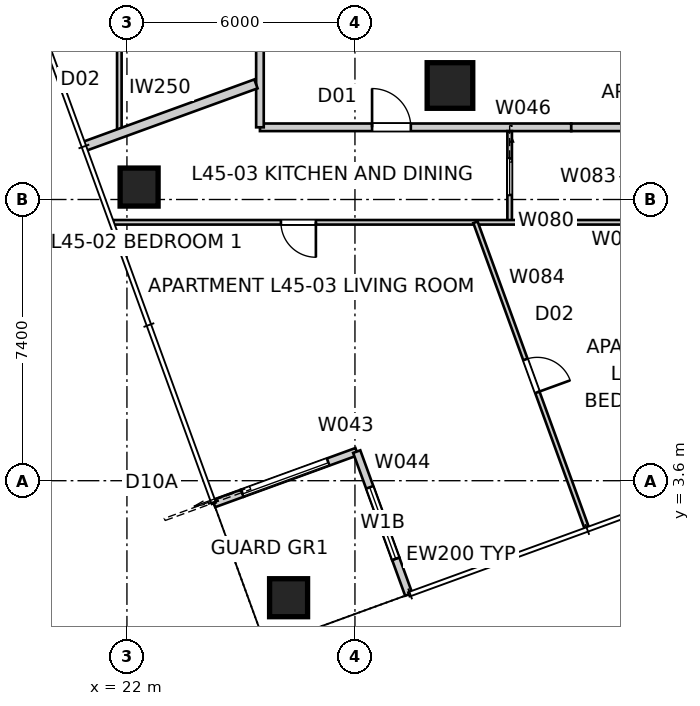
"""IFC4 building model, lengths in metres.
Left out: names, types, materials, properties, quantities, classifications, styles, units other than length and angle.
Written with IfcOpenShell. Run it as: python <this file> out.ifc"""

import sys

from ifc_helpers import new_model, si_unit, direction, frame, frame_2d, origin, origin_2d, place, context, subcontext, project, spatial, rectangle, extrude, element, fill, save


model = new_model("IFC4")
c1 = context("Model", 3, precision=1e-05, world=origin(), true_north=direction((0.0, 1.0)))
c2 = subcontext(c1, "Body", "Model", "MODEL_VIEW")
j1 = project(units=[si_unit("LENGTHUNIT", "METRE"), si_unit("PLANEANGLEUNIT", "RADIAN")], contexts=[c1])
p1 = place(None, origin())
s1 = spatial("IfcSite", under=j1, at=p1, CompositionType="ELEMENT")
p2 = place(p1, origin())
s2 = spatial("IfcBuilding", under=s1, at=p2, CompositionType="ELEMENT")
p3 = place(p2, frame((0.0, 0.0, 164.2)))
s3 = spatial("IfcBuildingStorey", under=s2, at=p3, CompositionType="ELEMENT", Elevation=164.2)
for number, where, z_axis, x_axis in (
    (1, (26.253, 0.521, 0.0), (0.0, 0.0, 1.0), (1.0, 0.0, 0.0)),
    (2, (22.32, 11.327, 0.0), (0.0, 0.0, 1.0), (1.0, 0.0, 0.0)),
):
    element("IfcColumn", number, at=place(p3, frame(where, z_axis=z_axis, x_axis=x_axis)), inside=s3, PredefinedType="COLUMN", context=c2, shape_type="SweptSolid", body=[
        extrude(rectangle(XDim=1.0, YDim=1.0, at=origin_2d()), origin(), (0.0, 0.0, 1.0), 3.4),
    ])
p4 = place(p3, frame((30.5, 14.0, 0.0), z_axis=(0.0, 0.0, 1.0), x_axis=(1.0, 0.0, 0.0)))
e3 = element("IfcColumn", 3, at=p4, inside=s3, PredefinedType="COLUMN", context=c2, shape_type="SweptSolid", body=[
    extrude(rectangle(XDim=1.2, YDim=1.2, at=origin_2d()), origin(), (0.0, 0.0, 1.0), 3.4),
])
p5 = place(p3, frame((24.288, 2.998, 0.0), z_axis=(0.0, 0.0, 1.0), x_axis=(0.939659694648, 0.342110593602, 0.0)))
e4 = element("IfcWall", 4, at=p5, inside=s3, PredefinedType="SOLIDWALL", context=c2, shape_type="SweptSolid", body=[
    extrude(rectangle(XDim=0.8, YDim=0.2, at=frame_2d((0.4, 0.0))), origin(), (0.0, 0.0, 1.0), 3.25),
])
p6 = place(p3, frame((25.04, 3.271, 0.0), z_axis=(0.0, 0.0, 1.0), x_axis=(0.939693144909, 0.342018703306, 0.0)))
e5 = element("IfcWall", 5, at=p6, inside=s3, PredefinedType="SOLIDWALL", context=c2, shape_type="SweptSolid", body=[
    extrude(rectangle(XDim=3.2, YDim=0.2, at=frame_2d((1.6, 0.0))), origin(), (0.0, 0.0, 1.0), 2.722),
])
p7 = place(p6, origin())
e6 = element("IfcOpeningElement", 6, at=p7, cuts=e5, PredefinedType="OPENING", context=c2, shape_type="SweptSolid", body=[
    extrude(rectangle(XDim=2.4, YDim=2.1, at=frame_2d((1.2, 1.05))), frame((0.0, 0.11, 0.0), z_axis=(0.0, -1.0, 0.0), x_axis=(1.0, 0.0, 0.0)), (0.0, 0.0, 1.0), 0.22),
])
p8 = place(p3, frame((28.047, 4.366, 0.0), z_axis=(0.0, 0.0, 1.0), x_axis=(0.341965219194, -0.939712609717, 0.0)))
e7 = element("IfcWall", 7, at=p8, inside=s3, PredefinedType="SOLIDWALL", context=c2, shape_type="SweptSolid", body=[
    extrude(rectangle(XDim=3.0, YDim=0.2, at=frame_2d((1.5, 0.0))), origin(), (0.0, 0.0, 1.0), 2.722),
])
p9 = place(p8, frame((1.0, 0.0, 0.45)))
e8 = element("IfcOpeningElement", 8, at=p9, cuts=e7, PredefinedType="OPENING", context=c2, shape_type="SweptSolid", body=[
    extrude(rectangle(XDim=2.0, YDim=1.8, at=frame_2d((1.0, 0.9))), frame((0.0, 0.11, 0.0), z_axis=(0.0, -1.0, 0.0), x_axis=(1.0, 0.0, 0.0)), (0.0, 0.0, 1.0), 0.22),
])
p10 = place(p3, frame((29.073, 1.547, 0.0), z_axis=(0.0, 0.0, 1.0), x_axis=(0.342037080957, -0.939686455819, 0.0)))
e9 = element("IfcWall", 9, at=p10, inside=s3, PredefinedType="SOLIDWALL", context=c2, shape_type="SweptSolid", body=[
    extrude(rectangle(XDim=1.0, YDim=0.2, at=frame_2d((0.5, 0.0))), origin(), (0.0, 0.0, 1.0), 3.25),
])
p11 = place(p3, frame((25.5, 12.9, 0.0), z_axis=(0.0, 0.0, 1.0), x_axis=(1.0, 0.0, 0.0)))
e10 = element("IfcWall", 10, at=p11, inside=s3, PredefinedType="PARTITIONING", context=c2, shape_type="SweptSolid", body=[
    extrude(rectangle(XDim=8.192, YDim=0.2, at=frame_2d((4.096, 0.0))), origin(), (0.0, 0.0, 1.0), 3.25),
])
p12 = place(p11, frame((2.95, 0.0, 0.0)))
e11 = element("IfcOpeningElement", 11, at=p12, cuts=e10, PredefinedType="OPENING", context=c2, shape_type="SweptSolid", body=[
    extrude(rectangle(XDim=1.02, YDim=2.34, at=frame_2d((0.51, 1.17))), frame((0.0, 0.11, 0.0), z_axis=(0.0, -1.0, 0.0), x_axis=(1.0, 0.0, 0.0)), (0.0, 0.0, 1.0), 0.22),
])
p13 = place(p3, frame((33.692, 12.9, 0.0), z_axis=(0.0, 0.0, 1.0), x_axis=(1.0, 0.0, 0.0)))
e12 = element("IfcWall", 12, at=p13, inside=s3, PredefinedType="PARTITIONING", context=c2, shape_type="SweptSolid", body=[
    extrude(rectangle(XDim=1.683, YDim=0.2, at=frame_2d((0.842, 0.0))), origin(), (0.0, 0.0, 1.0), 2.55),
])
p14 = place(p3, frame((25.5, 46.7, 0.0), z_axis=(0.0, 0.0, 1.0), x_axis=(0.0, -1.0, 0.0)))
e13 = element("IfcWall", 13, at=p14, inside=s3, PredefinedType="PARTITIONING", context=c2, shape_type="SweptSolid", body=[
    extrude(rectangle(XDim=33.8, YDim=0.2, at=frame_2d((16.9, 0.0))), origin(), (0.0, 0.0, 1.0), 3.25),
])
p15 = place(p14, frame((28.951, 0.0, 0.0)))
e14 = element("IfcOpeningElement", 14, at=p15, cuts=e13, PredefinedType="OPENING", context=c2, shape_type="SweptSolid", body=[
    extrude(rectangle(XDim=1.02, YDim=2.34, at=frame_2d((0.51, 1.17))), frame((0.0, 0.11, 0.0), z_axis=(0.0, -1.0, 0.0), x_axis=(1.0, 0.0, 0.0)), (0.0, 0.0, 1.0), 0.22),
])
p16 = place(p14, frame((13.881, 0.0, 0.0)))
e15 = element("IfcOpeningElement", 15, at=p16, cuts=e13, PredefinedType="OPENING", context=c2, shape_type="SweptSolid", body=[
    extrude(rectangle(XDim=1.02, YDim=2.34, at=frame_2d((0.51, 1.17))), frame((0.0, 0.11, 0.0), z_axis=(0.0, -1.0, 0.0), x_axis=(1.0, 0.0, 0.0)), (0.0, 0.0, 1.0), 0.22),
])
p17 = place(p14, frame((1.97, 0.0, 0.0)))
e16 = element("IfcOpeningElement", 16, at=p17, cuts=e13, PredefinedType="OPENING", context=c2, shape_type="SweptSolid", body=[
    extrude(rectangle(XDim=1.02, YDim=2.34, at=frame_2d((0.51, 1.17))), frame((0.0, 0.11, 0.0), z_axis=(0.0, -1.0, 0.0), x_axis=(1.0, 0.0, 0.0)), (0.0, 0.0, 1.0), 0.22),
])
p18 = place(p3, frame((20.868, 12.395, 0.0), z_axis=(0.0, 0.0, 1.0), x_axis=(0.939677962656, 0.342060413521, 0.0)))
e17 = element("IfcWall", 17, at=p18, inside=s3, PredefinedType="PARTITIONING", context=c2, shape_type="SweptSolid", body=[
    extrude(rectangle(XDim=4.818, YDim=0.25, at=frame_2d((2.409, 0.0))), origin(), (0.0, 0.0, 1.0), 3.25),
])
p19 = place(p3, frame((21.8, 12.734, 0.0), z_axis=(0.0, 0.0, 1.0), x_axis=(0.0, 1.0, 0.0)))
e18 = element("IfcWall", 18, at=p19, inside=s3, PredefinedType="PARTITIONING", context=c2, shape_type="SweptSolid", body=[
    extrude(rectangle(XDim=29.357, YDim=0.12, at=frame_2d((14.678, 0.0))), origin(), (0.0, 0.0, 1.0), 3.25),
])
p20 = place(p19, frame((2.227, 0.0, 0.0)))
e19 = element("IfcOpeningElement", 19, at=p20, cuts=e18, PredefinedType="OPENING", context=c2, shape_type="SweptSolid", body=[
    extrude(rectangle(XDim=0.92, YDim=2.34, at=frame_2d((0.46, 1.17))), frame((0.0, 0.07, 0.0), z_axis=(0.0, -1.0, 0.0), x_axis=(1.0, 0.0, 0.0)), (0.0, 0.0, 1.0), 0.14),
])
p21 = place(p19, frame((5.996, 0.0, 0.0)))
e20 = element("IfcOpeningElement", 20, at=p21, cuts=e18, PredefinedType="OPENING", context=c2, shape_type="SweptSolid", body=[
    extrude(rectangle(XDim=0.92, YDim=2.34, at=frame_2d((0.46, 1.17))), frame((0.0, 0.07, 0.0), z_axis=(0.0, -1.0, 0.0), x_axis=(1.0, 0.0, 0.0)), (0.0, 0.0, 1.0), 0.14),
])
p22 = place(p19, frame((18.415, 0.0, 0.0)))
e21 = element("IfcOpeningElement", 21, at=p22, cuts=e18, PredefinedType="OPENING", context=c2, shape_type="SweptSolid", body=[
    extrude(rectangle(XDim=0.92, YDim=2.34, at=frame_2d((0.46, 1.17))), frame((0.0, 0.07, 0.0), z_axis=(0.0, -1.0, 0.0), x_axis=(1.0, 0.0, 0.0)), (0.0, 0.0, 1.0), 0.14),
])
p23 = place(p19, frame((26.769, 0.0, 0.0)))
e22 = element("IfcOpeningElement", 22, at=p23, cuts=e18, PredefinedType="OPENING", context=c2, shape_type="SweptSolid", body=[
    extrude(rectangle(XDim=0.96, YDim=2.1, at=frame_2d((0.48, 1.05))), frame((0.0, 0.07, 0.0), z_axis=(0.0, -1.0, 0.0), x_axis=(1.0, 0.0, 0.0)), (0.0, 0.0, 1.0), 0.14),
])
p24 = place(p3, frame((32.071, 12.8, 0.0), z_axis=(0.0, 0.0, 1.0), x_axis=(0.0, -1.0, 0.0)))
e23 = element("IfcWall", 23, at=p24, inside=s3, PredefinedType="PARTITIONING", context=c2, shape_type="SweptSolid", body=[
    extrude(rectangle(XDim=2.4, YDim=0.12, at=frame_2d((1.2, 0.0))), origin(), (0.0, 0.0, 1.0), 3.25),
])
p25 = place(p24, frame((0.72, 0.0, 0.0)))
e24 = element("IfcOpeningElement", 24, at=p25, cuts=e23, PredefinedType="OPENING", context=c2, shape_type="SweptSolid", body=[
    extrude(rectangle(XDim=0.96, YDim=2.1, at=frame_2d((0.48, 1.05))), frame((0.0, 0.07, 0.0), z_axis=(0.0, -1.0, 0.0), x_axis=(1.0, 0.0, 0.0)), (0.0, 0.0, 1.0), 0.14),
])
p26 = place(p3, frame((56.281, 10.4, 0.0), z_axis=(0.0, 0.0, 1.0), x_axis=(-1.0, 0.0, 0.0)))
e25 = element("IfcWall", 25, at=p26, inside=s3, PredefinedType="PARTITIONING", context=c2, shape_type="SweptSolid", body=[
    extrude(rectangle(XDim=34.647, YDim=0.12, at=frame_2d((17.324, 0.0))), origin(), (0.0, 0.0, 1.0), 3.25),
])
p27 = place(p26, frame((29.309, 0.0, 0.0)))
e26 = element("IfcOpeningElement", 26, at=p27, cuts=e25, PredefinedType="OPENING", context=c2, shape_type="SweptSolid", body=[
    extrude(rectangle(XDim=0.92, YDim=2.34, at=frame_2d((0.46, 1.17))), frame((0.0, 0.07, 0.0), z_axis=(0.0, -1.0, 0.0), x_axis=(1.0, 0.0, 0.0)), (0.0, 0.0, 1.0), 0.14),
])
p28 = place(p26, frame((1.632, 0.0, 0.0)))
e27 = element("IfcOpeningElement", 27, at=p28, cuts=e25, PredefinedType="OPENING", context=c2, shape_type="SweptSolid", body=[
    extrude(rectangle(XDim=0.92, YDim=2.1, at=frame_2d((0.46, 1.05))), frame((0.0, 0.07, 0.0), z_axis=(0.0, -1.0, 0.0), x_axis=(1.0, 0.0, 0.0)), (0.0, 0.0, 1.0), 0.14),
])
p29 = place(p26, frame((16.938, 0.0, 0.0)))
e28 = element("IfcOpeningElement", 28, at=p29, cuts=e25, PredefinedType="OPENING", context=c2, shape_type="SweptSolid", body=[
    extrude(rectangle(XDim=0.96, YDim=2.1, at=frame_2d((0.48, 1.05))), frame((0.0, 0.07, 0.0), z_axis=(0.0, -1.0, 0.0), x_axis=(1.0, 0.0, 0.0)), (0.0, 0.0, 1.0), 0.14),
])
p30 = place(p26, frame((11.4, 0.0, 0.0)))
e29 = element("IfcOpeningElement", 29, at=p30, cuts=e25, PredefinedType="OPENING", context=c2, shape_type="SweptSolid", body=[
    extrude(rectangle(XDim=0.96, YDim=2.1, at=frame_2d((0.48, 1.05))), frame((0.0, 0.07, 0.0), z_axis=(0.0, -1.0, 0.0), x_axis=(1.0, 0.0, 0.0)), (0.0, 0.0, 1.0), 0.14),
])
p31 = place(p3, frame((31.171, 10.4, 0.0), z_axis=(0.0, 0.0, 1.0), x_axis=(0.34202238111, -0.939691806296, 0.0)))
e30 = element("IfcWall", 30, at=p31, inside=s3, PredefinedType="PARTITIONING", context=c2, shape_type="SweptSolid", body=[
    extrude(rectangle(XDim=8.562, YDim=0.12, at=frame_2d((4.281, 0.0))), origin(), (0.0, 0.0, 1.0), 3.25),
])
p32 = place(p31, frame((3.841, 0.0, 0.0)))
e31 = element("IfcOpeningElement", 31, at=p32, cuts=e30, PredefinedType="OPENING", context=c2, shape_type="SweptSolid", body=[
    extrude(rectangle(XDim=0.92, YDim=2.34, at=frame_2d((0.46, 1.17))), frame((0.0, 0.07, 0.0), z_axis=(0.0, -1.0, 0.0), x_axis=(1.0, 0.0, 0.0)), (0.0, 0.0, 1.0), 0.14),
])
p33 = place(p7, origin())
e32 = element("IfcDoor", 32, at=p33, inside=s3, OperationType="SLIDING_TO_LEFT", PredefinedType="DOOR", context=c2, shape_type="SweptSolid", body=[
    extrude(rectangle(XDim=2.4, YDim=2.1, at=frame_2d((1.2, 1.05))), frame((0.0, 0.025, 0.0), z_axis=(0.0, -1.0, 0.0), x_axis=(1.0, 0.0, 0.0)), (0.0, 0.0, 1.0), 0.05),
])
fill(e6, e32)
p34 = place(p9, origin())
e33 = element("IfcWindow", 33, at=p34, inside=s3, PartitioningType="SINGLE_PANEL", PredefinedType="WINDOW", context=c2, shape_type="SweptSolid", body=[
    extrude(rectangle(XDim=2.0, YDim=1.8, at=frame_2d((1.0, 0.9))), frame((0.0, 0.03, 0.0), z_axis=(0.0, -1.0, 0.0), x_axis=(1.0, 0.0, 0.0)), (0.0, 0.0, 1.0), 0.06),
])
fill(e8, e33)
p35 = place(p12, origin())
e34 = element("IfcDoor", 34, at=p35, inside=s3, OperationType="SINGLE_SWING_LEFT", PredefinedType="DOOR", context=c2, shape_type="SweptSolid", body=[
    extrude(rectangle(XDim=1.02, YDim=2.34, at=frame_2d((0.51, 1.17))), frame((0.0, 0.025, 0.0), z_axis=(0.0, -1.0, 0.0), x_axis=(1.0, 0.0, 0.0)), (0.0, 0.0, 1.0), 0.05),
])
fill(e11, e34)
p36 = place(p27, origin())
e35 = element("IfcDoor", 35, at=p36, inside=s3, OperationType="SINGLE_SWING_LEFT", PredefinedType="DOOR", context=c2, shape_type="SweptSolid", body=[
    extrude(rectangle(XDim=0.92, YDim=2.34, at=frame_2d((0.46, 1.17))), frame((0.0, 0.025, 0.0), z_axis=(0.0, -1.0, 0.0), x_axis=(1.0, 0.0, 0.0)), (0.0, 0.0, 1.0), 0.05),
])
fill(e26, e35)
p37 = place(p25, origin())
e36 = element("IfcDoor", 36, at=p37, inside=s3, OperationType="SLIDING_TO_LEFT", PredefinedType="DOOR", context=c2, shape_type="SweptSolid", body=[
    extrude(rectangle(XDim=0.96, YDim=2.1, at=frame_2d((0.48, 1.05))), frame((0.0, 0.025, 0.0), z_axis=(0.0, -1.0, 0.0), x_axis=(1.0, 0.0, 0.0)), (0.0, 0.0, 1.0), 0.05),
])
fill(e24, e36)
p38 = place(p32, origin())
e37 = element("IfcDoor", 37, at=p38, inside=s3, OperationType="SINGLE_SWING_RIGHT", PredefinedType="DOOR", context=c2, shape_type="SweptSolid", body=[
    extrude(rectangle(XDim=0.92, YDim=2.34, at=frame_2d((0.46, 1.17))), frame((0.0, 0.025, 0.0), z_axis=(0.0, -1.0, 0.0), x_axis=(1.0, 0.0, 0.0)), (0.0, 0.0, 1.0), 0.05),
])
fill(e31, e37)
save(model, sys.argv[1])
